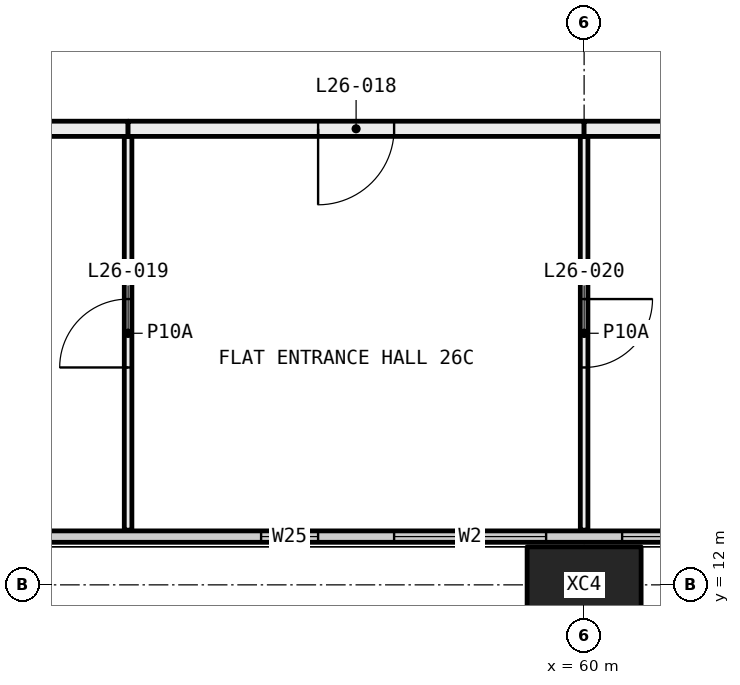
"""IFC4 building model, lengths in metres.
Left out: names, types, materials, properties, quantities, classifications, styles, units other than length and angle.
Written with IfcOpenShell. Run it as: python <this file> out.ifc"""

import sys

from ifc_helpers import new_model, si_unit, direction, frame, frame_2d, origin, origin_2d, place, context, subcontext, project, spatial, rectangle, hollow_rectangle, extrude, element, fill, save


model = new_model("IFC4")
c1 = context("Model", 3, precision=1e-05, world=origin(), true_north=direction((0.0, 1.0)))
c2 = subcontext(c1, "Body", "Model", "MODEL_VIEW")
j1 = project(units=[si_unit("LENGTHUNIT", "METRE"), si_unit("PLANEANGLEUNIT", "RADIAN")], contexts=[c1])
p1 = place(None, origin())
s1 = spatial("IfcSite", under=j1, at=p1, CompositionType="ELEMENT")
p2 = place(p1, origin())
s2 = spatial("IfcBuilding", under=s1, at=p2, CompositionType="ELEMENT")
p3 = place(p2, frame((0.0, 0.0, 103.5)))
s3 = spatial("IfcBuildingStorey", under=s2, at=p3, CompositionType="ELEMENT", Elevation=103.5)
p4 = place(p3, frame((60.0, 12.0, -0.4), z_axis=(0.0, 0.0, 1.0), x_axis=(1.0, 0.0, 0.0)))
e1 = element("IfcColumn", 1, at=p4, inside=s3, PredefinedType="COLUMN", context=c2, shape_type="SweptSolid", body=[
    extrude(hollow_rectangle(XDim=1.5, YDim=1.0, WallThickness=0.06, at=origin_2d()), origin(), (0.0, 0.0, 1.0), 3.45),
])
p5 = place(p3, frame((6.56, 12.635, 0.0), z_axis=(0.0, 0.0, 1.0), x_axis=(1.0, 0.0, 0.0)))
e2 = element("IfcWall", 2, at=p5, inside=s3, PredefinedType="ELEMENTEDWALL", context=c2, shape_type="SweptSolid", body=[
    extrude(rectangle(XDim=58.88, YDim=0.15, at=frame_2d((29.44, 0.0))), origin(), (0.0, 0.0, 1.0), 3.05),
])
p6 = place(p5, frame((0.44, 0.0, 0.45)))
e3 = element("IfcOpeningElement", 3, at=p6, cuts=e2, PredefinedType="OPENING", context=c2, shape_type="SweptSolid", body=[
    extrude(rectangle(XDim=4.5, YDim=2.55, at=frame_2d((2.25, 1.275))), frame((0.0, 0.085, 0.0), z_axis=(0.0, -1.0, 0.0), x_axis=(1.0, 0.0, 0.0)), (0.0, 0.0, 1.0), 0.17),
])
p7 = place(p5, frame((5.94, 0.0, 0.45)))
e4 = element("IfcOpeningElement", 4, at=p7, cuts=e2, PredefinedType="OPENING", context=c2, shape_type="SweptSolid", body=[
    extrude(rectangle(XDim=3.75, YDim=2.55, at=frame_2d((1.875, 1.275))), frame((0.0, 0.085, 0.0), z_axis=(0.0, -1.0, 0.0), x_axis=(1.0, 0.0, 0.0)), (0.0, 0.0, 1.0), 0.17),
])
p8 = place(p5, frame((13.19, 0.0, 0.45)))
e5 = element("IfcOpeningElement", 5, at=p8, cuts=e2, PredefinedType="OPENING", context=c2, shape_type="SweptSolid", body=[
    extrude(rectangle(XDim=3.75, YDim=2.55, at=frame_2d((1.875, 1.275))), frame((0.0, 0.085, 0.0), z_axis=(0.0, -1.0, 0.0), x_axis=(1.0, 0.0, 0.0)), (0.0, 0.0, 1.0), 0.17),
])
p9 = place(p5, frame((17.94, 0.0, 0.45)))
e6 = element("IfcOpeningElement", 6, at=p9, cuts=e2, PredefinedType="OPENING", context=c2, shape_type="SweptSolid", body=[
    extrude(rectangle(XDim=3.75, YDim=2.55, at=frame_2d((1.875, 1.275))), frame((0.0, 0.085, 0.0), z_axis=(0.0, -1.0, 0.0), x_axis=(1.0, 0.0, 0.0)), (0.0, 0.0, 1.0), 0.17),
])
p10 = place(p5, frame((25.19, 0.0, 0.45)))
e7 = element("IfcOpeningElement", 7, at=p10, cuts=e2, PredefinedType="OPENING", context=c2, shape_type="SweptSolid", body=[
    extrude(rectangle(XDim=0.75, YDim=2.55, at=frame_2d((0.375, 1.275))), frame((0.0, 0.085, 0.0), z_axis=(0.0, -1.0, 0.0), x_axis=(1.0, 0.0, 0.0)), (0.0, 0.0, 1.0), 0.17),
])
p11 = place(p5, frame((26.94, 0.0, 0.45)))
e8 = element("IfcOpeningElement", 8, at=p11, cuts=e2, PredefinedType="OPENING", context=c2, shape_type="SweptSolid", body=[
    extrude(rectangle(XDim=2.0, YDim=2.55, at=frame_2d((1.0, 1.275))), frame((0.0, 0.085, 0.0), z_axis=(0.0, -1.0, 0.0), x_axis=(1.0, 0.0, 0.0)), (0.0, 0.0, 1.0), 0.17),
])
p12 = place(p5, frame((29.94, 0.0, 0.45)))
e9 = element("IfcOpeningElement", 9, at=p12, cuts=e2, PredefinedType="OPENING", context=c2, shape_type="SweptSolid", body=[
    extrude(rectangle(XDim=3.75, YDim=2.55, at=frame_2d((1.875, 1.275))), frame((0.0, 0.085, 0.0), z_axis=(0.0, -1.0, 0.0), x_axis=(1.0, 0.0, 0.0)), (0.0, 0.0, 1.0), 0.17),
])
p13 = place(p5, frame((37.19, 0.0, 0.45)))
e10 = element("IfcOpeningElement", 10, at=p13, cuts=e2, PredefinedType="OPENING", context=c2, shape_type="SweptSolid", body=[
    extrude(rectangle(XDim=3.75, YDim=2.55, at=frame_2d((1.875, 1.275))), frame((0.0, 0.085, 0.0), z_axis=(0.0, -1.0, 0.0), x_axis=(1.0, 0.0, 0.0)), (0.0, 0.0, 1.0), 0.17),
])
p14 = place(p5, frame((41.94, 0.0, 0.45)))
e11 = element("IfcOpeningElement", 11, at=p14, cuts=e2, PredefinedType="OPENING", context=c2, shape_type="SweptSolid", body=[
    extrude(rectangle(XDim=3.75, YDim=2.55, at=frame_2d((1.875, 1.275))), frame((0.0, 0.085, 0.0), z_axis=(0.0, -1.0, 0.0), x_axis=(1.0, 0.0, 0.0)), (0.0, 0.0, 1.0), 0.17),
])
p15 = place(p5, frame((49.19, 0.0, 0.45)))
e12 = element("IfcOpeningElement", 12, at=p15, cuts=e2, PredefinedType="OPENING", context=c2, shape_type="SweptSolid", body=[
    extrude(rectangle(XDim=0.75, YDim=2.55, at=frame_2d((0.375, 1.275))), frame((0.0, 0.085, 0.0), z_axis=(0.0, -1.0, 0.0), x_axis=(1.0, 0.0, 0.0)), (0.0, 0.0, 1.0), 0.17),
])
p16 = place(p5, frame((50.94, 0.0, 0.45)))
e13 = element("IfcOpeningElement", 13, at=p16, cuts=e2, PredefinedType="OPENING", context=c2, shape_type="SweptSolid", body=[
    extrude(rectangle(XDim=2.0, YDim=2.55, at=frame_2d((1.0, 1.275))), frame((0.0, 0.085, 0.0), z_axis=(0.0, -1.0, 0.0), x_axis=(1.0, 0.0, 0.0)), (0.0, 0.0, 1.0), 0.17),
])
p17 = place(p5, frame((53.94, 0.0, 0.45)))
e14 = element("IfcOpeningElement", 14, at=p17, cuts=e2, PredefinedType="OPENING", context=c2, shape_type="SweptSolid", body=[
    extrude(rectangle(XDim=4.5, YDim=2.55, at=frame_2d((2.25, 1.275))), frame((0.0, 0.085, 0.0), z_axis=(0.0, -1.0, 0.0), x_axis=(1.0, 0.0, 0.0)), (0.0, 0.0, 1.0), 0.17),
])
p18 = place(p3, frame((54.0, 12.72, 0.0), z_axis=(0.0, 0.0, 1.0), x_axis=(0.0, 1.0, 0.0)))
e15 = element("IfcWall", 15, at=p18, inside=s3, PredefinedType="PARTITIONING", context=c2, shape_type="SweptSolid", body=[
    extrude(rectangle(XDim=5.18, YDim=0.1, at=frame_2d((2.59, 0.0))), origin(), (0.0, 0.0, 1.0), 3.05),
])
p19 = place(p18, frame((2.14, 0.0, 0.0)))
e16 = element("IfcOpeningElement", 16, at=p19, cuts=e15, PredefinedType="OPENING", context=c2, shape_type="SweptSolid", body=[
    extrude(rectangle(XDim=0.9, YDim=2.1, at=frame_2d((0.45, 1.05))), frame((0.0, 0.06, 0.0), z_axis=(0.0, -1.0, 0.0), x_axis=(1.0, 0.0, 0.0)), (0.0, 0.0, 1.0), 0.12),
])
p20 = place(p3, frame((54.0, 18.0, 0.0), z_axis=(0.0, 0.0, 1.0), x_axis=(-1.0, 0.0, 0.0)))
e17 = element("IfcWall", 17, at=p20, inside=s3, PredefinedType="PARTITIONING", context=c2, shape_type="SweptSolid", body=[
    extrude(rectangle(XDim=7.9, YDim=0.2, at=frame_2d((3.95, 0.0))), origin(), (0.0, 0.0, 1.0), 3.05),
])
p21 = place(p3, frame((60.0, 12.72, 0.0), z_axis=(0.0, 0.0, 1.0), x_axis=(0.0, 1.0, 0.0)))
e18 = element("IfcWall", 18, at=p21, inside=s3, PredefinedType="PARTITIONING", context=c2, shape_type="SweptSolid", body=[
    extrude(rectangle(XDim=5.18, YDim=0.1, at=frame_2d((2.59, 0.0))), origin(), (0.0, 0.0, 1.0), 3.05),
])
p22 = place(p21, frame((2.14, 0.0, 0.0)))
e19 = element("IfcOpeningElement", 19, at=p22, cuts=e18, PredefinedType="OPENING", context=c2, shape_type="SweptSolid", body=[
    extrude(rectangle(XDim=0.9, YDim=2.1, at=frame_2d((0.45, 1.05))), frame((0.0, 0.06, 0.0), z_axis=(0.0, -1.0, 0.0), x_axis=(1.0, 0.0, 0.0)), (0.0, 0.0, 1.0), 0.12),
])
p23 = place(p3, frame((60.0, 18.0, 0.0), z_axis=(0.0, 0.0, 1.0), x_axis=(-1.0, 0.0, 0.0)))
e20 = element("IfcWall", 20, at=p23, inside=s3, PredefinedType="PARTITIONING", context=c2, shape_type="SweptSolid", body=[
    extrude(rectangle(XDim=6.0, YDim=0.2, at=frame_2d((3.0, 0.0))), origin(), (0.0, 0.0, 1.0), 3.05),
])
p24 = place(p23, frame((2.5, 0.0, 0.0)))
e21 = element("IfcOpeningElement", 21, at=p24, cuts=e20, PredefinedType="OPENING", context=c2, shape_type="SweptSolid", body=[
    extrude(rectangle(XDim=1.0, YDim=2.1, at=frame_2d((0.5, 1.05))), frame((0.0, 0.11, 0.0), z_axis=(0.0, -1.0, 0.0), x_axis=(1.0, 0.0, 0.0)), (0.0, 0.0, 1.0), 0.22),
])
p25 = place(p3, frame((61.9, 18.0, 0.0), z_axis=(0.0, 0.0, 1.0), x_axis=(-1.0, 0.0, 0.0)))
e22 = element("IfcWall", 22, at=p25, inside=s3, PredefinedType="PARTITIONING", context=c2, shape_type="SweptSolid", body=[
    extrude(rectangle(XDim=1.9, YDim=0.2, at=frame_2d((0.95, 0.0))), origin(), (0.0, 0.0, 1.0), 3.05),
])
p26 = place(p15, origin())
e23 = element("IfcWindow", 23, at=p26, inside=s3, PartitioningType="SINGLE_PANEL", PredefinedType="WINDOW", context=c2, shape_type="SweptSolid", body=[
    extrude(rectangle(XDim=0.75, YDim=2.55, at=frame_2d((0.375, 1.275))), frame((0.0, 0.03, 0.0), z_axis=(0.0, -1.0, 0.0), x_axis=(1.0, 0.0, 0.0)), (0.0, 0.0, 1.0), 0.06),
])
fill(e12, e23)
p27 = place(p16, origin())
e24 = element("IfcWindow", 24, at=p27, inside=s3, PartitioningType="SINGLE_PANEL", PredefinedType="WINDOW", context=c2, shape_type="SweptSolid", body=[
    extrude(rectangle(XDim=2.0, YDim=2.55, at=frame_2d((1.0, 1.275))), frame((0.0, 0.03, 0.0), z_axis=(0.0, -1.0, 0.0), x_axis=(1.0, 0.0, 0.0)), (0.0, 0.0, 1.0), 0.06),
])
fill(e13, e24)
p28 = place(p17, origin())
e25 = element("IfcWindow", 25, at=p28, inside=s3, PartitioningType="SINGLE_PANEL", PredefinedType="WINDOW", context=c2, shape_type="SweptSolid", body=[
    extrude(rectangle(XDim=4.5, YDim=2.55, at=frame_2d((2.25, 1.275))), frame((0.0, 0.03, 0.0), z_axis=(0.0, -1.0, 0.0), x_axis=(1.0, 0.0, 0.0)), (0.0, 0.0, 1.0), 0.06),
])
fill(e14, e25)
p29 = place(p24, origin())
e26 = element("IfcDoor", 26, at=p29, inside=s3, OperationType="SINGLE_SWING_LEFT", PredefinedType="DOOR", context=c2, shape_type="SweptSolid", body=[
    extrude(rectangle(XDim=1.0, YDim=2.1, at=frame_2d((0.5, 1.05))), frame((0.0, 0.025, 0.0), z_axis=(0.0, -1.0, 0.0), x_axis=(1.0, 0.0, 0.0)), (0.0, 0.0, 1.0), 0.05),
])
fill(e21, e26)
p30 = place(p19, origin())
e27 = element("IfcDoor", 27, at=p30, inside=s3, OperationType="SINGLE_SWING_RIGHT", PredefinedType="DOOR", context=c2, shape_type="SweptSolid", body=[
    extrude(rectangle(XDim=0.9, YDim=2.1, at=frame_2d((0.45, 1.05))), frame((0.0, 0.025, 0.0), z_axis=(0.0, -1.0, 0.0), x_axis=(1.0, 0.0, 0.0)), (0.0, 0.0, 1.0), 0.05),
])
fill(e16, e27)
p31 = place(p22, frame((0.9, 0.0, 0.0), x_axis=(-1.0, 0.0, 0.0)))
e28 = element("IfcDoor", 28, at=p31, inside=s3, OperationType="SINGLE_SWING_RIGHT", PredefinedType="DOOR", context=c2, shape_type="SweptSolid", body=[
    extrude(rectangle(XDim=0.9, YDim=2.1, at=frame_2d((0.45, 1.05))), frame((0.0, 0.025, 0.0), z_axis=(0.0, -1.0, 0.0), x_axis=(1.0, 0.0, 0.0)), (0.0, 0.0, 1.0), 0.05),
])
fill(e19, e28)
save(model, sys.argv[1])
